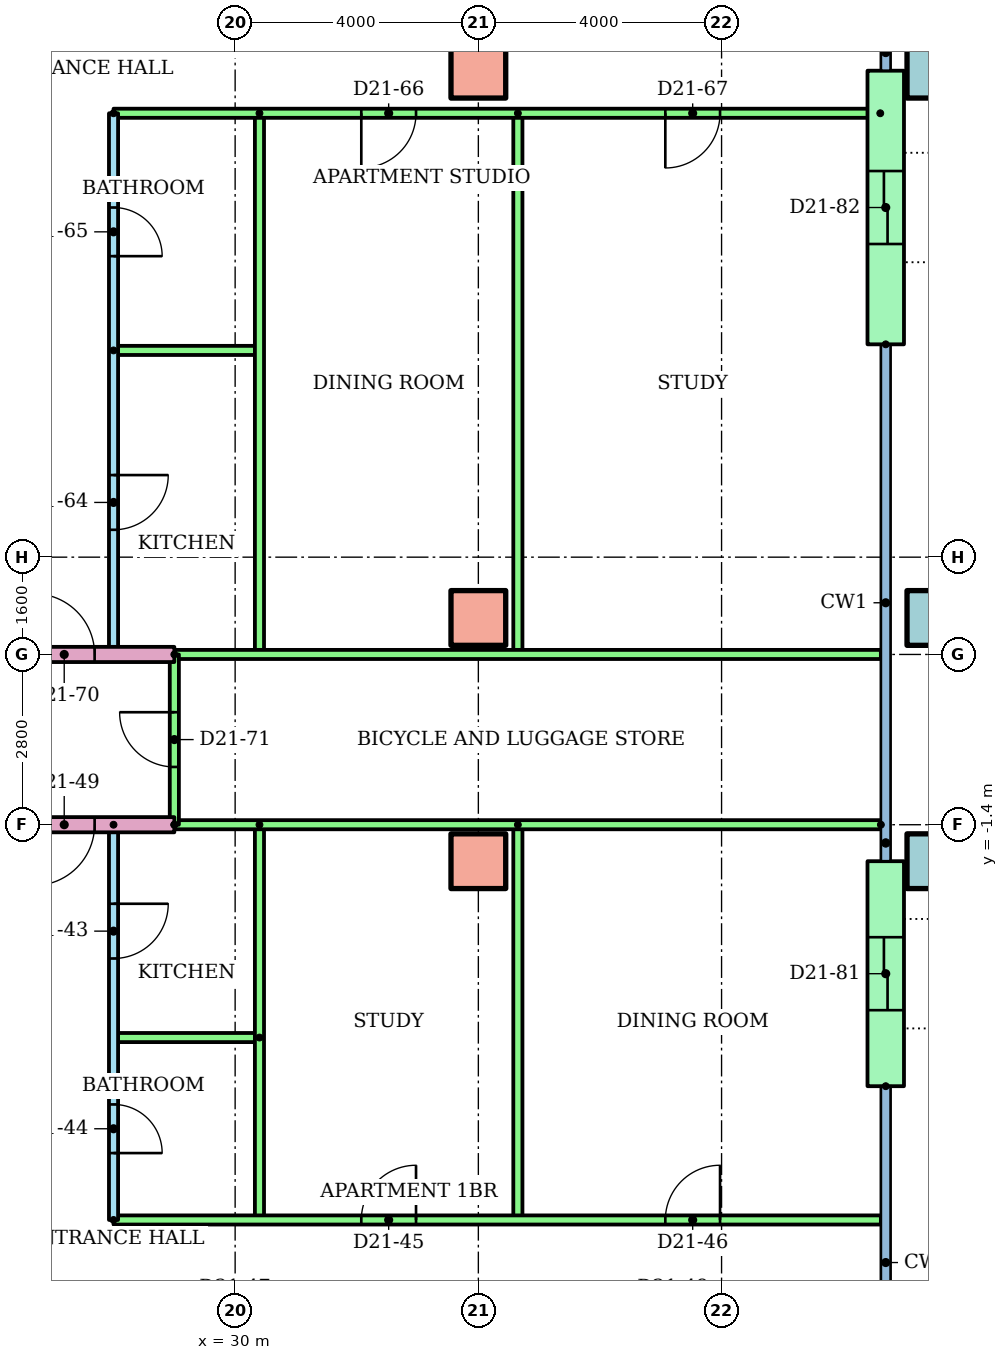
"""IFC4 building model, lengths in metres.
Left out: names, types, materials, properties, quantities, classifications, styles, units other than length and angle.
Written with IfcOpenShell. Run it as: python <this file> out.ifc"""

import sys

from ifc_helpers import new_model, si_unit, direction, frame, frame_2d, origin, origin_2d, place, context, subcontext, project, spatial, rectangle, hollow_rectangle, extrude, element, fill, save


model = new_model("IFC4")
c1 = context("Model", 3, precision=1e-05, world=origin(), true_north=direction((0.0, 1.0)))
c2 = subcontext(c1, "Body", "Model", "MODEL_VIEW")
j1 = project(units=[si_unit("LENGTHUNIT", "METRE"), si_unit("PLANEANGLEUNIT", "RADIAN")], contexts=[c1])
p1 = place(None, origin())
s1 = spatial("IfcSite", under=j1, at=p1, CompositionType="ELEMENT")
p2 = place(p1, origin())
s2 = spatial("IfcBuilding", under=s1, at=p2, CompositionType="ELEMENT")
p3 = place(p2, frame((0.0, 0.0, 83.9)))
s3 = spatial("IfcBuildingStorey", under=s2, at=p3, CompositionType="ELEMENT", Elevation=83.9)
p4 = place(p3, frame((34.0, -2.0, 0.0)))
e1 = element("IfcColumn", 1, at=p4, inside=s3, PredefinedType="COLUMN", context=c2, shape_type="SweptSolid", body=[
    extrude(rectangle(XDim=0.9, YDim=0.9, at=origin_2d()), origin(), (0.0, 0.0, 1.0), 3.2),
])
p5 = place(p3, frame((41.5, -2.0, 0.0)))
e2 = element("IfcColumn", 2, at=p5, inside=s3, PredefinedType="COLUMN", context=c2, shape_type="SweptSolid", body=[
    extrude(hollow_rectangle(XDim=0.9, YDim=0.9, WallThickness=0.045, at=origin_2d()), origin(), (0.0, 0.0, 1.0), 3.2),
])
p6 = place(p3, frame((34.0, 2.0, 0.0)))
e3 = element("IfcColumn", 3, at=p6, inside=s3, PredefinedType="COLUMN", context=c2, shape_type="SweptSolid", body=[
    extrude(rectangle(XDim=0.9, YDim=0.9, at=origin_2d()), origin(), (0.0, 0.0, 1.0), 3.2),
])
p7 = place(p3, frame((41.5, 2.0, 0.0)))
e4 = element("IfcColumn", 4, at=p7, inside=s3, PredefinedType="COLUMN", context=c2, shape_type="SweptSolid", body=[
    extrude(hollow_rectangle(XDim=0.9, YDim=0.9, WallThickness=0.045, at=origin_2d()), origin(), (0.0, 0.0, 1.0), 3.2),
])
p8 = place(p3, frame((34.0, 11.0, 0.0)))
e5 = element("IfcColumn", 5, at=p8, inside=s3, PredefinedType="COLUMN", context=c2, shape_type="SweptSolid", body=[
    extrude(rectangle(XDim=0.9, YDim=0.9, at=origin_2d()), origin(), (0.0, 0.0, 1.0), 3.2),
])
p9 = place(p3, frame((41.5, 11.0, 0.0)))
e6 = element("IfcColumn", 6, at=p9, inside=s3, PredefinedType="COLUMN", context=c2, shape_type="SweptSolid", body=[
    extrude(hollow_rectangle(XDim=0.9, YDim=0.9, WallThickness=0.045, at=origin_2d()), origin(), (0.0, 0.0, 1.0), 3.2),
])
p10 = place(p3, frame((40.7, -5.7, 0.0), z_axis=(0.0, 0.0, 1.0), x_axis=(0.0, 1.0, 0.0)))
e7 = element("IfcWall", 7, at=p10, inside=s3, PredefinedType="STANDARD", context=c2, shape_type="SweptSolid", body=[
    extrude(rectangle(XDim=3.7, YDim=0.6, at=frame_2d((1.85, 0.0))), origin(), (0.0, 0.0, 1.0), 2.92),
])
p11 = place(p10, frame((1.25, 0.0, 0.0)))
e8 = element("IfcOpeningElement", 8, at=p11, cuts=e7, PredefinedType="OPENING", context=c2, shape_type="SweptSolid", body=[
    extrude(rectangle(XDim=1.2, YDim=2.1, at=frame_2d((0.6, 1.05))), frame((0.0, 0.31, 0.0), z_axis=(0.0, -1.0, 0.0), x_axis=(1.0, 0.0, 0.0)), (0.0, 0.0, 1.0), 0.62),
])
p12 = place(p3, frame((40.7, 6.5, 0.0), z_axis=(0.0, 0.0, 1.0), x_axis=(0.0, 1.0, 0.0)))
e9 = element("IfcWall", 9, at=p12, inside=s3, PredefinedType="STANDARD", context=c2, shape_type="SweptSolid", body=[
    extrude(rectangle(XDim=4.5, YDim=0.6, at=frame_2d((2.25, 0.0))), origin(), (0.0, 0.0, 1.0), 2.92),
])
p13 = place(p12, frame((1.65, 0.0, 0.0)))
e10 = element("IfcOpeningElement", 10, at=p13, cuts=e9, PredefinedType="OPENING", context=c2, shape_type="SweptSolid", body=[
    extrude(rectangle(XDim=1.2, YDim=2.1, at=frame_2d((0.6, 1.05))), frame((0.0, 0.31, 0.0), z_axis=(0.0, -1.0, 0.0), x_axis=(1.0, 0.0, 0.0)), (0.0, 0.0, 1.0), 0.62),
])
p14 = place(p3, frame((28.0, -1.4, 0.0), z_axis=(0.0, 0.0, 1.0), x_axis=(0.0, -1.0, 0.0)))
e11 = element("IfcWall", 11, at=p14, inside=s3, PredefinedType="PARTITIONING", context=c2, shape_type="SweptSolid", body=[
    extrude(rectangle(XDim=6.5, YDim=0.15, at=frame_2d((3.25, 0.0))), origin(), (0.0, 0.0, 1.0), 2.4),
])
p15 = place(p14, frame((1.3, 0.0, 0.0)))
e12 = element("IfcOpeningElement", 12, at=p15, cuts=e11, PredefinedType="OPENING", context=c2, shape_type="SweptSolid", body=[
    extrude(rectangle(XDim=0.9, YDim=2.1, at=frame_2d((0.45, 1.05))), frame((0.0, 0.085, 0.0), z_axis=(0.0, -1.0, 0.0), x_axis=(1.0, 0.0, 0.0)), (0.0, 0.0, 1.0), 0.17),
])
p16 = place(p14, frame((4.6, 0.0, 0.0)))
e13 = element("IfcOpeningElement", 13, at=p16, cuts=e11, PredefinedType="OPENING", context=c2, shape_type="SweptSolid", body=[
    extrude(rectangle(XDim=0.8, YDim=2.1, at=frame_2d((0.4, 1.05))), frame((0.0, 0.085, 0.0), z_axis=(0.0, -1.0, 0.0), x_axis=(1.0, 0.0, 0.0)), (0.0, 0.0, 1.0), 0.17),
])
p17 = place(p3, frame((30.4, -4.9, 0.0), z_axis=(0.0, 0.0, 1.0), x_axis=(-1.0, 0.0, 0.0)))
e14 = element("IfcWall", 14, at=p17, inside=s3, PredefinedType="PARTITIONING", context=c2, shape_type="SweptSolid", body=[
    extrude(rectangle(XDim=2.4, YDim=0.15, at=frame_2d((1.2, 0.0))), origin(), (0.0, 0.0, 1.0), 2.4),
])
for number, where, z_axis, x_axis in (
    (15, (30.4, -1.4, 0.0), (0.0, 0.0, 1.0), (0.0, -1.0, 0.0)),
    (16, (34.65, -1.4, 0.0), (0.0, 0.0, 1.0), (0.0, -1.0, 0.0)),
):
    element("IfcWall", number, at=place(p3, frame(where, z_axis=z_axis, x_axis=x_axis)), inside=s3, PredefinedType="PARTITIONING", context=c2, shape_type="SweptSolid", body=[
        extrude(rectangle(XDim=6.5, YDim=0.15, at=frame_2d((3.25, 0.0))), origin(), (0.0, 0.0, 1.0), 2.4),
    ])
p18 = place(p3, frame((28.0, -7.9, 0.0)))
e17 = element("IfcWall", 17, at=p18, inside=s3, PredefinedType="PARTITIONING", context=c2, shape_type="SweptSolid", body=[
    extrude(rectangle(XDim=12.62, YDim=0.15, at=frame_2d((6.31, 0.0))), origin(), (0.0, 0.0, 1.0), 2.4),
])
p19 = place(p18, frame((4.075, 0.0, 0.0)))
e18 = element("IfcOpeningElement", 18, at=p19, cuts=e17, PredefinedType="OPENING", context=c2, shape_type="SweptSolid", body=[
    extrude(rectangle(XDim=0.9, YDim=2.1, at=frame_2d((0.45, 1.05))), frame((0.0, 0.085, 0.0), z_axis=(0.0, -1.0, 0.0), x_axis=(1.0, 0.0, 0.0)), (0.0, 0.0, 1.0), 0.17),
])
p20 = place(p18, frame((9.075, 0.0, 0.0)))
e19 = element("IfcOpeningElement", 19, at=p20, cuts=e17, PredefinedType="OPENING", context=c2, shape_type="SweptSolid", body=[
    extrude(rectangle(XDim=0.9, YDim=2.1, at=frame_2d((0.45, 1.05))), frame((0.0, 0.085, 0.0), z_axis=(0.0, -1.0, 0.0), x_axis=(1.0, 0.0, 0.0)), (0.0, 0.0, 1.0), 0.17),
])
p21 = place(p3, frame((29.0, -1.4, 0.0), z_axis=(0.0, 0.0, 1.0), x_axis=(-1.0, 0.0, 0.0)))
e20 = element("IfcWall", 20, at=p21, inside=s3, PredefinedType="PARTITIONING", context=c2, shape_type="SweptSolid", body=[
    extrude(rectangle(XDim=15.0, YDim=0.25, at=frame_2d((7.5, 0.0))), origin(), (0.0, 0.0, 1.0), 2.4),
])
p22 = place(p21, frame((1.311, 0.0, 0.0)))
e21 = element("IfcOpeningElement", 21, at=p22, cuts=e20, PredefinedType="OPENING", context=c2, shape_type="SweptSolid", body=[
    extrude(rectangle(XDim=1.0, YDim=2.1, at=frame_2d((0.5, 1.05))), frame((0.0, 0.135, 0.0), z_axis=(0.0, -1.0, 0.0), x_axis=(1.0, 0.0, 0.0)), (0.0, 0.0, 1.0), 0.27),
])
p23 = place(p3, frame((40.62, -1.4, 0.0), z_axis=(0.0, 0.0, 1.0), x_axis=(-1.0, 0.0, 0.0)))
e22 = element("IfcWall", 22, at=p23, inside=s3, PredefinedType="PARTITIONING", context=c2, shape_type="SweptSolid", body=[
    extrude(rectangle(XDim=11.62, YDim=0.15, at=frame_2d((5.81, 0.0))), origin(), (0.0, 0.0, 1.0), 2.4),
])
p24 = place(p3, frame((28.0, 10.3, 0.0), z_axis=(0.0, 0.0, 1.0), x_axis=(0.0, -1.0, 0.0)))
e23 = element("IfcWall", 23, at=p24, inside=s3, PredefinedType="PARTITIONING", context=c2, shape_type="SweptSolid", body=[
    extrude(rectangle(XDim=8.9, YDim=0.15, at=frame_2d((4.45, 0.0))), origin(), (0.0, 0.0, 1.0), 2.4),
])
p25 = place(p24, frame((5.95, 0.0, 0.0)))
e24 = element("IfcOpeningElement", 24, at=p25, cuts=e23, PredefinedType="OPENING", context=c2, shape_type="SweptSolid", body=[
    extrude(rectangle(XDim=0.9, YDim=2.1, at=frame_2d((0.45, 1.05))), frame((0.0, 0.085, 0.0), z_axis=(0.0, -1.0, 0.0), x_axis=(1.0, 0.0, 0.0)), (0.0, 0.0, 1.0), 0.17),
])
p26 = place(p24, frame((1.55, 0.0, 0.0)))
e25 = element("IfcOpeningElement", 25, at=p26, cuts=e23, PredefinedType="OPENING", context=c2, shape_type="SweptSolid", body=[
    extrude(rectangle(XDim=0.8, YDim=2.1, at=frame_2d((0.4, 1.05))), frame((0.0, 0.085, 0.0), z_axis=(0.0, -1.0, 0.0), x_axis=(1.0, 0.0, 0.0)), (0.0, 0.0, 1.0), 0.17),
])
p27 = place(p3, frame((28.0, 6.4, 0.0)))
e26 = element("IfcWall", 26, at=p27, inside=s3, PredefinedType="PARTITIONING", context=c2, shape_type="SweptSolid", body=[
    extrude(rectangle(XDim=2.4, YDim=0.15, at=frame_2d((1.2, 0.0))), origin(), (0.0, 0.0, 1.0), 2.4),
])
for number, where, z_axis, x_axis in (
    (27, (30.4, 10.3, 0.0), (0.0, 0.0, 1.0), (0.0, -1.0, 0.0)),
    (28, (34.65, 10.3, 0.0), (0.0, 0.0, 1.0), (0.0, -1.0, 0.0)),
):
    element("IfcWall", number, at=place(p3, frame(where, z_axis=z_axis, x_axis=x_axis)), inside=s3, PredefinedType="PARTITIONING", context=c2, shape_type="SweptSolid", body=[
        extrude(rectangle(XDim=8.9, YDim=0.15, at=frame_2d((4.45, 0.0))), origin(), (0.0, 0.0, 1.0), 2.4),
    ])
p28 = place(p3, frame((40.61, 10.3, 0.0), z_axis=(0.0, 0.0, 1.0), x_axis=(-1.0, 0.0, 0.0)))
e29 = element("IfcWall", 29, at=p28, inside=s3, PredefinedType="PARTITIONING", context=c2, shape_type="SweptSolid", body=[
    extrude(rectangle(XDim=12.61, YDim=0.15, at=frame_2d((6.305, 0.0))), origin(), (0.0, 0.0, 1.0), 2.4),
])
p29 = place(p28, frame((7.635, 0.0, 0.0)))
e30 = element("IfcOpeningElement", 30, at=p29, cuts=e29, PredefinedType="OPENING", context=c2, shape_type="SweptSolid", body=[
    extrude(rectangle(XDim=0.9, YDim=2.1, at=frame_2d((0.45, 1.05))), frame((0.0, 0.085, 0.0), z_axis=(0.0, -1.0, 0.0), x_axis=(1.0, 0.0, 0.0)), (0.0, 0.0, 1.0), 0.17),
])
p30 = place(p28, frame((2.635, 0.0, 0.0)))
e31 = element("IfcOpeningElement", 31, at=p30, cuts=e29, PredefinedType="OPENING", context=c2, shape_type="SweptSolid", body=[
    extrude(rectangle(XDim=0.9, YDim=2.1, at=frame_2d((0.45, 1.05))), frame((0.0, 0.085, 0.0), z_axis=(0.0, -1.0, 0.0), x_axis=(1.0, 0.0, 0.0)), (0.0, 0.0, 1.0), 0.17),
])
p31 = place(p3, frame((14.0, 1.4, 0.0)))
e32 = element("IfcWall", 32, at=p31, inside=s3, PredefinedType="PARTITIONING", context=c2, shape_type="SweptSolid", body=[
    extrude(rectangle(XDim=15.0, YDim=0.25, at=frame_2d((7.5, 0.0))), origin(), (0.0, 0.0, 1.0), 2.4),
])
p32 = place(p31, frame((0.5, 0.0, 0.0)))
e33 = element("IfcOpeningElement", 33, at=p32, cuts=e32, PredefinedType="OPENING", context=c2, shape_type="SweptSolid", body=[
    extrude(rectangle(XDim=1.0, YDim=2.1, at=frame_2d((0.5, 1.05))), frame((0.0, 0.135, 0.0), z_axis=(0.0, -1.0, 0.0), x_axis=(1.0, 0.0, 0.0)), (0.0, 0.0, 1.0), 0.27),
])
p33 = place(p31, frame((12.689, 0.0, 0.0)))
e34 = element("IfcOpeningElement", 34, at=p33, cuts=e32, PredefinedType="OPENING", context=c2, shape_type="SweptSolid", body=[
    extrude(rectangle(XDim=1.0, YDim=2.1, at=frame_2d((0.5, 1.05))), frame((0.0, 0.135, 0.0), z_axis=(0.0, -1.0, 0.0), x_axis=(1.0, 0.0, 0.0)), (0.0, 0.0, 1.0), 0.27),
])
p34 = place(p3, frame((29.0, 1.4, 0.0)))
e35 = element("IfcWall", 35, at=p34, inside=s3, PredefinedType="PARTITIONING", context=c2, shape_type="SweptSolid", body=[
    extrude(rectangle(XDim=11.62, YDim=0.15, at=frame_2d((5.81, 0.0))), origin(), (0.0, 0.0, 1.0), 2.4),
])
p35 = place(p3, frame((29.0, -1.4, 0.0), z_axis=(0.0, 0.0, 1.0), x_axis=(0.0, 1.0, 0.0)))
e36 = element("IfcWall", 36, at=p35, inside=s3, PredefinedType="PARTITIONING", context=c2, shape_type="SweptSolid", body=[
    extrude(rectangle(XDim=2.8, YDim=0.15, at=frame_2d((1.4, 0.0))), origin(), (0.0, 0.0, 1.0), 2.4),
])
p36 = place(p35, frame((0.95, 0.0, 0.0)))
e37 = element("IfcOpeningElement", 37, at=p36, cuts=e36, PredefinedType="OPENING", context=c2, shape_type="SweptSolid", body=[
    extrude(rectangle(XDim=0.9, YDim=2.1, at=frame_2d((0.45, 1.05))), frame((0.0, 0.085, 0.0), z_axis=(0.0, -1.0, 0.0), x_axis=(1.0, 0.0, 0.0)), (0.0, 0.0, 1.0), 0.17),
])
p37 = place(p15, origin())
e38 = element("IfcDoor", 38, at=p37, inside=s3, OperationType="SINGLE_SWING_LEFT", PredefinedType="DOOR", context=c2, shape_type="SweptSolid", body=[
    extrude(rectangle(XDim=0.9, YDim=2.1, at=frame_2d((0.45, 1.05))), frame((0.0, 0.025, 0.0), z_axis=(0.0, -1.0, 0.0), x_axis=(1.0, 0.0, 0.0)), (0.0, 0.0, 1.0), 0.05),
])
fill(e12, e38)
p38 = place(p16, origin())
e39 = element("IfcDoor", 39, at=p38, inside=s3, OperationType="SINGLE_SWING_RIGHT", PredefinedType="DOOR", context=c2, shape_type="SweptSolid", body=[
    extrude(rectangle(XDim=0.8, YDim=2.1, at=frame_2d((0.4, 1.05))), frame((0.0, 0.025, 0.0), z_axis=(0.0, -1.0, 0.0), x_axis=(1.0, 0.0, 0.0)), (0.0, 0.0, 1.0), 0.05),
])
fill(e13, e39)
p39 = place(p19, origin())
e40 = element("IfcDoor", 40, at=p39, inside=s3, OperationType="SINGLE_SWING_RIGHT", PredefinedType="DOOR", context=c2, shape_type="SweptSolid", body=[
    extrude(rectangle(XDim=0.9, YDim=2.1, at=frame_2d((0.45, 1.05))), frame((0.0, 0.025, 0.0), z_axis=(0.0, -1.0, 0.0), x_axis=(1.0, 0.0, 0.0)), (0.0, 0.0, 1.0), 0.05),
])
fill(e18, e40)
p40 = place(p20, origin())
e41 = element("IfcDoor", 41, at=p40, inside=s3, OperationType="SINGLE_SWING_RIGHT", PredefinedType="DOOR", context=c2, shape_type="SweptSolid", body=[
    extrude(rectangle(XDim=0.9, YDim=2.1, at=frame_2d((0.45, 1.05))), frame((0.0, 0.025, 0.0), z_axis=(0.0, -1.0, 0.0), x_axis=(1.0, 0.0, 0.0)), (0.0, 0.0, 1.0), 0.05),
])
fill(e19, e41)
p41 = place(p22, origin())
e42 = element("IfcDoor", 42, at=p41, inside=s3, OperationType="SINGLE_SWING_RIGHT", PredefinedType="DOOR", context=c2, shape_type="SweptSolid", body=[
    extrude(rectangle(XDim=1.0, YDim=2.1, at=frame_2d((0.5, 1.05))), frame((0.0, 0.025, 0.0), z_axis=(0.0, -1.0, 0.0), x_axis=(1.0, 0.0, 0.0)), (0.0, 0.0, 1.0), 0.05),
])
fill(e21, e42)
p42 = place(p25, origin())
e43 = element("IfcDoor", 43, at=p42, inside=s3, OperationType="SINGLE_SWING_LEFT", PredefinedType="DOOR", context=c2, shape_type="SweptSolid", body=[
    extrude(rectangle(XDim=0.9, YDim=2.1, at=frame_2d((0.45, 1.05))), frame((0.0, 0.025, 0.0), z_axis=(0.0, -1.0, 0.0), x_axis=(1.0, 0.0, 0.0)), (0.0, 0.0, 1.0), 0.05),
])
fill(e24, e43)
p43 = place(p26, origin())
e44 = element("IfcDoor", 44, at=p43, inside=s3, OperationType="SINGLE_SWING_RIGHT", PredefinedType="DOOR", context=c2, shape_type="SweptSolid", body=[
    extrude(rectangle(XDim=0.8, YDim=2.1, at=frame_2d((0.4, 1.05))), frame((0.0, 0.025, 0.0), z_axis=(0.0, -1.0, 0.0), x_axis=(1.0, 0.0, 0.0)), (0.0, 0.0, 1.0), 0.05),
])
fill(e25, e44)
p44 = place(p29, origin())
e45 = element("IfcDoor", 45, at=p44, inside=s3, OperationType="SINGLE_SWING_RIGHT", PredefinedType="DOOR", context=c2, shape_type="SweptSolid", body=[
    extrude(rectangle(XDim=0.9, YDim=2.1, at=frame_2d((0.45, 1.05))), frame((0.0, 0.025, 0.0), z_axis=(0.0, -1.0, 0.0), x_axis=(1.0, 0.0, 0.0)), (0.0, 0.0, 1.0), 0.05),
])
fill(e30, e45)
p45 = place(p30, origin())
e46 = element("IfcDoor", 46, at=p45, inside=s3, OperationType="SINGLE_SWING_RIGHT", PredefinedType="DOOR", context=c2, shape_type="SweptSolid", body=[
    extrude(rectangle(XDim=0.9, YDim=2.1, at=frame_2d((0.45, 1.05))), frame((0.0, 0.025, 0.0), z_axis=(0.0, -1.0, 0.0), x_axis=(1.0, 0.0, 0.0)), (0.0, 0.0, 1.0), 0.05),
])
fill(e31, e46)
p46 = place(p33, origin())
e47 = element("IfcDoor", 47, at=p46, inside=s3, OperationType="SINGLE_SWING_LEFT", PredefinedType="DOOR", context=c2, shape_type="SweptSolid", body=[
    extrude(rectangle(XDim=1.0, YDim=2.1, at=frame_2d((0.5, 1.05))), frame((0.0, 0.025, 0.0), z_axis=(0.0, -1.0, 0.0), x_axis=(1.0, 0.0, 0.0)), (0.0, 0.0, 1.0), 0.05),
])
fill(e34, e47)
p47 = place(p36, origin())
e48 = element("IfcDoor", 48, at=p47, inside=s3, OperationType="SINGLE_SWING_RIGHT", PredefinedType="DOOR", context=c2, shape_type="SweptSolid", body=[
    extrude(rectangle(XDim=0.9, YDim=2.1, at=frame_2d((0.45, 1.05))), frame((0.0, 0.025, 0.0), z_axis=(0.0, -1.0, 0.0), x_axis=(1.0, 0.0, 0.0)), (0.0, 0.0, 1.0), 0.05),
])
fill(e37, e48)
p48 = place(p11, origin())
e49 = element("IfcDoor", 49, at=p48, inside=s3, OperationType="SLIDING_TO_LEFT", PredefinedType="DOOR", context=c2, shape_type="SweptSolid", body=[
    extrude(rectangle(XDim=1.2, YDim=2.1, at=frame_2d((0.6, 1.05))), frame((0.0, 0.025, 0.0), z_axis=(0.0, -1.0, 0.0), x_axis=(1.0, 0.0, 0.0)), (0.0, 0.0, 1.0), 0.05),
])
fill(e8, e49)
p49 = place(p13, origin())
e50 = element("IfcDoor", 50, at=p49, inside=s3, OperationType="SLIDING_TO_LEFT", PredefinedType="DOOR", context=c2, shape_type="SweptSolid", body=[
    extrude(rectangle(XDim=1.2, YDim=2.1, at=frame_2d((0.6, 1.05))), frame((0.0, 0.025, 0.0), z_axis=(0.0, -1.0, 0.0), x_axis=(1.0, 0.0, 0.0)), (0.0, 0.0, 1.0), 0.05),
])
fill(e10, e50)
save(model, sys.argv[1])
